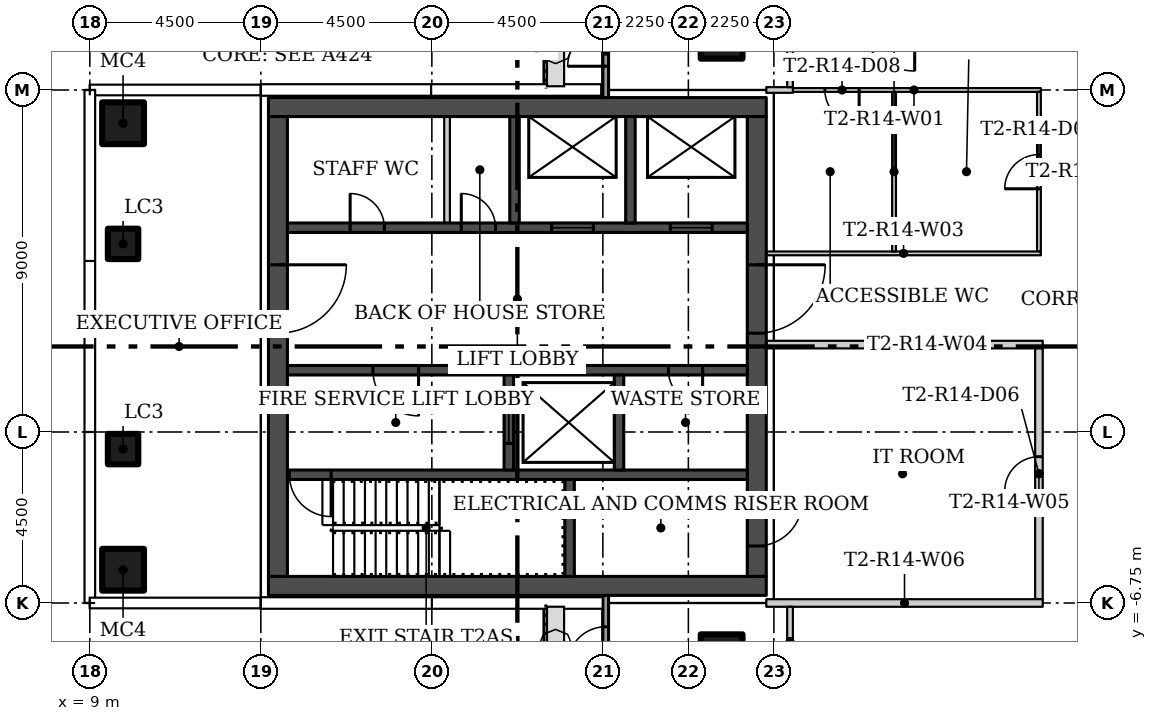
"""IFC4 building model, lengths in metres.
Left out: names, types, materials, properties, quantities, classifications, styles, units other than length and angle.
Written with IfcOpenShell. Run it as: python <this file> out.ifc"""

import sys

from ifc_helpers import new_model, si_unit, direction, frame, frame_2d, origin, origin_2d, place, context, subcontext, project, spatial, rectangle, hollow_rectangle, extrude, element, fill, save


model = new_model("IFC4")
c1 = context("Model", 3, precision=1e-05, world=origin(), true_north=direction((0.0, 1.0)))
c2 = subcontext(c1, "Body", "Model", "MODEL_VIEW")
j1 = project(units=[si_unit("LENGTHUNIT", "METRE"), si_unit("PLANEANGLEUNIT", "RADIAN")], contexts=[c1])
p1 = place(None, origin())
s1 = spatial("IfcSite", under=j1, at=p1, CompositionType="ELEMENT")
p2 = place(p1, origin())
s2 = spatial("IfcBuilding", under=s1, at=p2, CompositionType="ELEMENT")
p3 = place(p2, frame((0.0, 0.0, 138.9)))
s3 = spatial("IfcBuildingStorey", under=s2, at=p3, CompositionType="ELEMENT", Elevation=138.9)
for number, where in (
    (1, (25.625, 8.125, 0.0)),
    (2, (25.625, -8.125, 0.0)),
    (3, (9.875, -5.875, 0.0)),
    (4, (9.875, 5.875, 0.0)),
):
    element("IfcColumn", number, at=place(p3, frame(where)), inside=s3, PredefinedType="COLUMN", context=c2, shape_type="SweptSolid", body=[
        extrude(hollow_rectangle(XDim=1.1, YDim=1.1, WallThickness=0.04, at=origin_2d()), origin(), (0.0, 0.0, 1.0), 3.55),
    ])
for number, where in (
    (5, (9.875, -2.7, 0.0)),
    (6, (9.875, 2.7, 0.0)),
):
    element("IfcColumn", number, at=place(p3, frame(where)), inside=s3, PredefinedType="COLUMN", context=c2, shape_type="SweptSolid", body=[
        extrude(hollow_rectangle(XDim=0.8, YDim=0.8, WallThickness=0.03, at=origin_2d()), origin(), (0.0, 0.0, 1.0), 3.55),
    ])
p4 = place(p3, frame((34.025, 6.75, 0.0), z_axis=(0.0, 0.0, 1.0), x_axis=(-1.0, 0.0, 0.0)))
e7 = element("IfcWall", 7, at=p4, inside=s3, PredefinedType="PARTITIONING", context=c2, shape_type="SweptSolid", body=[
    extrude(rectangle(XDim=6.675, YDim=0.1, at=frame_2d((3.337, 0.0))), origin(), (0.0, 0.0, 1.0), 3.55),
])
p5 = place(p4, frame((4.781, 0.0, 0.0)))
e8 = element("IfcOpeningElement", 8, at=p5, cuts=e7, PredefinedType="OPENING", context=c2, shape_type="SweptSolid", body=[
    extrude(rectangle(XDim=0.9, YDim=2.1, at=frame_2d((0.45, 1.05))), frame((0.0, 0.06, 0.0), z_axis=(0.0, -1.0, 0.0), x_axis=(1.0, 0.0, 0.0)), (0.0, 0.0, 1.0), 0.12),
])
p6 = place(p3, frame((33.975, 2.5, 0.0), z_axis=(0.0, 0.0, 1.0), x_axis=(0.0, 1.0, 0.0)))
e9 = element("IfcWall", 9, at=p6, inside=s3, PredefinedType="PARTITIONING", context=c2, shape_type="SweptSolid", body=[
    extrude(rectangle(XDim=4.2, YDim=0.1, at=frame_2d((2.1, 0.0))), origin(), (0.0, 0.0, 1.0), 3.55),
])
p7 = place(p6, frame((1.65, 0.0, 0.0)))
e10 = element("IfcOpeningElement", 10, at=p7, cuts=e9, PredefinedType="OPENING", context=c2, shape_type="SweptSolid", body=[
    extrude(rectangle(XDim=0.9, YDim=2.1, at=frame_2d((0.45, 1.05))), frame((0.0, 0.06, 0.0), z_axis=(0.0, -1.0, 0.0), x_axis=(1.0, 0.0, 0.0)), (0.0, 0.0, 1.0), 0.12),
])
p8 = place(p3, frame((26.8, 2.45, 0.0)))
e11 = element("IfcWall", 11, at=p8, inside=s3, PredefinedType="PARTITIONING", context=c2, shape_type="SweptSolid", body=[
    extrude(rectangle(XDim=7.225, YDim=0.1, at=frame_2d((3.612, 0.0))), origin(), (0.0, 0.0, 1.0), 3.55),
])
p9 = place(p3, frame((34.075, 0.05, 0.0), z_axis=(0.0, 0.0, 1.0), x_axis=(-1.0, 0.0, 0.0)))
e12 = element("IfcWall", 12, at=p9, inside=s3, PredefinedType="PARTITIONING", context=c2, shape_type="SweptSolid", body=[
    extrude(rectangle(XDim=7.275, YDim=0.2, at=frame_2d((3.637, 0.0))), origin(), (0.0, 0.0, 1.0), 3.55),
])
p10 = place(p3, frame((33.975, -6.65, 0.0), z_axis=(0.0, 0.0, 1.0), x_axis=(0.0, 1.0, 0.0)))
e13 = element("IfcWall", 13, at=p10, inside=s3, PredefinedType="PARTITIONING", context=c2, shape_type="SweptSolid", body=[
    extrude(rectangle(XDim=6.6, YDim=0.2, at=frame_2d((3.3, 0.0))), origin(), (0.0, 0.0, 1.0), 3.55),
])
p11 = place(p10, frame((2.85, 0.0, 0.0)))
e14 = element("IfcOpeningElement", 14, at=p11, cuts=e13, PredefinedType="OPENING", context=c2, shape_type="SweptSolid", body=[
    extrude(rectangle(XDim=0.9, YDim=2.1, at=frame_2d((0.45, 1.05))), frame((0.0, 0.11, 0.0), z_axis=(0.0, -1.0, 0.0), x_axis=(1.0, 0.0, 0.0)), (0.0, 0.0, 1.0), 0.22),
])
p12 = place(p3, frame((26.8, -6.75, 0.0)))
e15 = element("IfcWall", 15, at=p12, inside=s3, PredefinedType="PARTITIONING", context=c2, shape_type="SweptSolid", body=[
    extrude(rectangle(XDim=7.275, YDim=0.2, at=frame_2d((3.637, 0.0))), origin(), (0.0, 0.0, 1.0), 3.55),
])
p13 = place(p3, frame((27.5, 6.75, 0.0), z_axis=(0.0, 0.0, 1.0), x_axis=(-1.0, 0.0, 0.0)))
e16 = element("IfcWall", 16, at=p13, inside=s3, PredefinedType="PARTITIONING", context=c2, shape_type="SweptSolid", body=[
    extrude(rectangle(XDim=0.7, YDim=0.15, at=frame_2d((0.35, 0.0))), origin(), (0.0, 0.0, 1.0), 3.55),
])
p14 = place(p3, frame((27.425, -6.85, 0.0), z_axis=(0.0, 0.0, 1.0), x_axis=(0.0, -1.0, 0.0)))
e17 = element("IfcWall", 17, at=p14, inside=s3, PredefinedType="PARTITIONING", context=c2, shape_type="SweptSolid", body=[
    extrude(rectangle(XDim=1.825, YDim=0.15, at=frame_2d((0.913, 0.0))), origin(), (0.0, 0.0, 1.0), 3.55),
])
p15 = place(p3, frame((27.425, 8.675, 0.0), z_axis=(0.0, 0.0, 1.0), x_axis=(0.0, -1.0, 0.0)))
e18 = element("IfcWall", 18, at=p15, inside=s3, PredefinedType="PARTITIONING", context=c2, shape_type="SweptSolid", body=[
    extrude(rectangle(XDim=1.85, YDim=0.15, at=frame_2d((0.925, 0.0))), origin(), (0.0, 0.0, 1.0), 3.55),
])
p16 = place(p3, frame((30.162, 6.7, 0.0), z_axis=(0.0, 0.0, 1.0), x_axis=(0.0, -1.0, 0.0)))
e19 = element("IfcWall", 19, at=p16, inside=s3, PredefinedType="PARTITIONING", context=c2, shape_type="SweptSolid", body=[
    extrude(rectangle(XDim=4.2, YDim=0.1, at=frame_2d((2.1, 0.0))), origin(), (0.0, 0.0, 1.0), 3.55),
])
p17 = place(p3, frame((22.575, 6.543, 0.0), z_axis=(0.0, 0.0, 1.0), x_axis=(0.0, 1.0, 0.0)))
e20 = element("IfcWall", 20, at=p17, inside=s3, PredefinedType="SOLIDWALL", context=c2, shape_type="SweptSolid", body=[
    extrude(rectangle(XDim=2.457, YDim=0.15, at=frame_2d((1.229, 0.0))), origin(), (0.0, 0.0, 1.0), 3.45),
])
p18 = place(p17, frame((0.832, 0.0, 0.0)))
e21 = element("IfcOpeningElement", 21, at=p18, cuts=e20, PredefinedType="OPENING", context=c2, shape_type="SweptSolid", body=[
    extrude(rectangle(XDim=1.0, YDim=2.4, at=frame_2d((0.5, 1.2))), frame((0.0, 0.085, 0.0), z_axis=(0.0, -1.0, 0.0), x_axis=(1.0, 0.0, 0.0)), (0.0, 0.0, 1.0), 0.17),
])
p19 = place(p3, frame((22.575, -9.0, 0.0), z_axis=(0.0, 0.0, 1.0), x_axis=(0.0, 1.0, 0.0)))
e22 = element("IfcWall", 22, at=p19, inside=s3, PredefinedType="SOLIDWALL", context=c2, shape_type="SweptSolid", body=[
    extrude(rectangle(XDim=2.457, YDim=0.15, at=frame_2d((1.229, 0.0))), origin(), (0.0, 0.0, 1.0), 3.45),
])
p20 = place(p19, frame((0.625, 0.0, 0.0)))
e23 = element("IfcOpeningElement", 23, at=p20, cuts=e22, PredefinedType="OPENING", context=c2, shape_type="SweptSolid", body=[
    extrude(rectangle(XDim=1.0, YDim=2.4, at=frame_2d((0.5, 1.2))), frame((0.0, 0.085, 0.0), z_axis=(0.0, -1.0, 0.0), x_axis=(1.0, 0.0, 0.0)), (0.0, 0.0, 1.0), 0.17),
])
for number, where in (
    (24, (13.7, -6.3, 0.0)),
    (25, (13.7, 6.3, 0.0)),
):
    element("IfcWall", number, at=place(p3, frame(where)), inside=s3, PredefinedType="SHEAR", context=c2, shape_type="SweptSolid", body=[
        extrude(rectangle(XDim=13.1, YDim=0.5, at=frame_2d((6.55, 0.0))), origin(), (0.0, 0.0, 1.0), 3.55),
    ])
p21 = place(p3, frame((13.95, 6.05, 0.0), z_axis=(0.0, 0.0, 1.0), x_axis=(0.0, -1.0, 0.0)))
e26 = element("IfcWall", 26, at=p21, inside=s3, PredefinedType="SHEAR", context=c2, shape_type="SweptSolid", body=[
    extrude(rectangle(XDim=12.1, YDim=0.5, at=frame_2d((6.05, 0.0))), origin(), (0.0, 0.0, 1.0), 3.55),
])
p22 = place(p21, frame((3.9, 0.0, 0.0)))
e27 = element("IfcOpeningElement", 27, at=p22, cuts=e26, PredefinedType="OPENING", context=c2, shape_type="SweptSolid", body=[
    extrude(rectangle(XDim=1.8, YDim=2.4, at=frame_2d((0.9, 1.2))), frame((0.0, 0.26, 0.0), z_axis=(0.0, -1.0, 0.0), x_axis=(1.0, 0.0, 0.0)), (0.0, 0.0, 1.0), 0.52),
])
p23 = place(p3, frame((26.55, 6.05, 0.0), z_axis=(0.0, 0.0, 1.0), x_axis=(0.0, -1.0, 0.0)))
e28 = element("IfcWall", 28, at=p23, inside=s3, PredefinedType="SHEAR", context=c2, shape_type="SweptSolid", body=[
    extrude(rectangle(XDim=12.1, YDim=0.5, at=frame_2d((6.05, 0.0))), origin(), (0.0, 0.0, 1.0), 3.55),
])
p24 = place(p23, frame((10.1, 0.0, 0.0)))
e29 = element("IfcOpeningElement", 29, at=p24, cuts=e28, PredefinedType="OPENING", context=c2, shape_type="SweptSolid", body=[
    extrude(rectangle(XDim=1.2, YDim=2.1, at=frame_2d((0.6, 1.05))), frame((0.0, 0.26, 0.0), z_axis=(0.0, -1.0, 0.0), x_axis=(1.0, 0.0, 0.0)), (0.0, 0.0, 1.0), 0.52),
])
p25 = place(p23, frame((3.9, 0.0, 0.0)))
e30 = element("IfcOpeningElement", 30, at=p25, cuts=e28, PredefinedType="OPENING", context=c2, shape_type="SweptSolid", body=[
    extrude(rectangle(XDim=1.8, YDim=2.4, at=frame_2d((0.9, 1.2))), frame((0.0, 0.26, 0.0), z_axis=(0.0, -1.0, 0.0), x_axis=(1.0, 0.0, 0.0)), (0.0, 0.0, 1.0), 0.52),
])
p26 = place(p3, frame((26.3, -3.375, 0.0), z_axis=(0.0, 0.0, 1.0), x_axis=(-1.0, 0.0, 0.0)))
e31 = element("IfcWall", 31, at=p26, inside=s3, PredefinedType="SHEAR", context=c2, shape_type="SweptSolid", body=[
    extrude(rectangle(XDim=12.1, YDim=0.25, at=frame_2d((6.05, 0.0))), origin(), (0.0, 0.0, 1.0), 3.55),
])
p27 = place(p26, frame((10.95, 0.0, 0.0)))
e32 = element("IfcOpeningElement", 32, at=p27, cuts=e31, PredefinedType="OPENING", context=c2, shape_type="SweptSolid", body=[
    extrude(rectangle(XDim=1.1, YDim=2.1, at=frame_2d((0.55, 1.05))), frame((0.0, 0.135, 0.0), z_axis=(0.0, -1.0, 0.0), x_axis=(1.0, 0.0, 0.0)), (0.0, 0.0, 1.0), 0.27),
])
p28 = place(p3, frame((21.625, -6.05, 0.0), z_axis=(0.0, 0.0, 1.0), x_axis=(0.0, 1.0, 0.0)))
e33 = element("IfcWall", 33, at=p28, inside=s3, PredefinedType="SHEAR", context=c2, shape_type="SweptSolid", body=[
    extrude(rectangle(XDim=2.55, YDim=0.25, at=frame_2d((1.275, 0.0))), origin(), (0.0, 0.0, 1.0), 3.55),
])
p29 = place(p3, frame((26.3, -0.625, 0.0), z_axis=(0.0, 0.0, 1.0), x_axis=(-1.0, 0.0, 0.0)))
e34 = element("IfcWall", 34, at=p29, inside=s3, PredefinedType="SHEAR", context=c2, shape_type="SweptSolid", body=[
    extrude(rectangle(XDim=12.1, YDim=0.25, at=frame_2d((6.05, 0.0))), origin(), (0.0, 0.0, 1.0), 3.55),
])
p30 = place(p29, frame((8.65, 0.0, 0.0)))
e35 = element("IfcOpeningElement", 35, at=p30, cuts=e34, PredefinedType="OPENING", context=c2, shape_type="SweptSolid", body=[
    extrude(rectangle(XDim=1.2, YDim=2.1, at=frame_2d((0.6, 1.05))), frame((0.0, 0.135, 0.0), z_axis=(0.0, -1.0, 0.0), x_axis=(1.0, 0.0, 0.0)), (0.0, 0.0, 1.0), 0.27),
])
p31 = place(p29, frame((1.175, 0.0, 0.0)))
e36 = element("IfcOpeningElement", 36, at=p31, cuts=e34, PredefinedType="OPENING", context=c2, shape_type="SweptSolid", body=[
    extrude(rectangle(XDim=0.9, YDim=2.1, at=frame_2d((0.45, 1.05))), frame((0.0, 0.135, 0.0), z_axis=(0.0, -1.0, 0.0), x_axis=(1.0, 0.0, 0.0)), (0.0, 0.0, 1.0), 0.27),
])
p32 = place(p3, frame((20.025, -3.25, 0.0), z_axis=(0.0, 0.0, 1.0), x_axis=(0.0, 1.0, 0.0)))
e37 = element("IfcWall", 37, at=p32, inside=s3, PredefinedType="SHEAR", context=c2, shape_type="SweptSolid", body=[
    extrude(rectangle(XDim=2.5, YDim=0.25, at=frame_2d((1.25, 0.0))), origin(), (0.0, 0.0, 1.0), 3.55),
])
p33 = place(p32, frame((0.7, 0.0, 0.0)))
e38 = element("IfcOpeningElement", 38, at=p33, cuts=e37, PredefinedType="OPENING", context=c2, shape_type="SweptSolid", body=[
    extrude(rectangle(XDim=1.1, YDim=2.1, at=frame_2d((0.55, 1.05))), frame((0.0, 0.135, 0.0), z_axis=(0.0, -1.0, 0.0), x_axis=(1.0, 0.0, 0.0)), (0.0, 0.0, 1.0), 0.27),
])
p34 = place(p3, frame((22.925, -3.25, 0.0), z_axis=(0.0, 0.0, 1.0), x_axis=(0.0, 1.0, 0.0)))
e39 = element("IfcWall", 39, at=p34, inside=s3, PredefinedType="SHEAR", context=c2, shape_type="SweptSolid", body=[
    extrude(rectangle(XDim=2.5, YDim=0.25, at=frame_2d((1.25, 0.0))), origin(), (0.0, 0.0, 1.0), 3.55),
])
p35 = place(p3, frame((14.2, 3.125, 0.0)))
e40 = element("IfcWall", 40, at=p35, inside=s3, PredefinedType="SHEAR", context=c2, shape_type="SweptSolid", body=[
    extrude(rectangle(XDim=12.1, YDim=0.25, at=frame_2d((6.05, 0.0))), origin(), (0.0, 0.0, 1.0), 3.55),
])
p36 = place(p35, frame((6.95, 0.0, 0.0)))
e41 = element("IfcOpeningElement", 41, at=p36, cuts=e40, PredefinedType="OPENING", context=c2, shape_type="SweptSolid", body=[
    extrude(rectangle(XDim=1.1, YDim=2.1, at=frame_2d((0.55, 1.05))), frame((0.0, 0.135, 0.0), z_axis=(0.0, -1.0, 0.0), x_axis=(1.0, 0.0, 0.0)), (0.0, 0.0, 1.0), 0.27),
])
p37 = place(p35, frame((10.075, 0.0, 0.0)))
e42 = element("IfcOpeningElement", 42, at=p37, cuts=e40, PredefinedType="OPENING", context=c2, shape_type="SweptSolid", body=[
    extrude(rectangle(XDim=1.1, YDim=2.1, at=frame_2d((0.55, 1.05))), frame((0.0, 0.135, 0.0), z_axis=(0.0, -1.0, 0.0), x_axis=(1.0, 0.0, 0.0)), (0.0, 0.0, 1.0), 0.27),
])
p38 = place(p35, frame((1.65, 0.0, 0.0)))
e43 = element("IfcOpeningElement", 43, at=p38, cuts=e40, PredefinedType="OPENING", context=c2, shape_type="SweptSolid", body=[
    extrude(rectangle(XDim=0.9, YDim=2.1, at=frame_2d((0.45, 1.05))), frame((0.0, 0.135, 0.0), z_axis=(0.0, -1.0, 0.0), x_axis=(1.0, 0.0, 0.0)), (0.0, 0.0, 1.0), 0.27),
])
p39 = place(p35, frame((4.575, 0.0, 0.0)))
e44 = element("IfcOpeningElement", 44, at=p39, cuts=e40, PredefinedType="OPENING", context=c2, shape_type="SweptSolid", body=[
    extrude(rectangle(XDim=0.9, YDim=2.1, at=frame_2d((0.45, 1.05))), frame((0.0, 0.135, 0.0), z_axis=(0.0, -1.0, 0.0), x_axis=(1.0, 0.0, 0.0)), (0.0, 0.0, 1.0), 0.27),
])
for number, where, z_axis, x_axis in (
    (45, (20.175, 3.25, 0.0), (0.0, 0.0, 1.0), (0.0, 1.0, 0.0)),
    (46, (23.225, 3.25, 0.0), (0.0, 0.0, 1.0), (0.0, 1.0, 0.0)),
):
    element("IfcWall", number, at=place(p3, frame(where, z_axis=z_axis, x_axis=x_axis)), inside=s3, PredefinedType="SHEAR", context=c2, shape_type="SweptSolid", body=[
        extrude(rectangle(XDim=2.8, YDim=0.25, at=frame_2d((1.4, 0.0))), origin(), (0.0, 0.0, 1.0), 3.55),
    ])
p40 = place(p3, frame((18.4, 3.25, 0.0), z_axis=(0.0, 0.0, 1.0), x_axis=(0.0, 1.0, 0.0)))
e47 = element("IfcWall", 47, at=p40, inside=s3, PredefinedType="PARTITIONING", context=c2, shape_type="SweptSolid", body=[
    extrude(rectangle(XDim=2.8, YDim=0.15, at=frame_2d((1.4, 0.0))), origin(), (0.0, 0.0, 1.0), 3.55),
])
p41 = place(p11, origin())
e48 = element("IfcDoor", 48, at=p41, inside=s3, OperationType="SINGLE_SWING_LEFT", PredefinedType="DOOR", context=c2, shape_type="SweptSolid", body=[
    extrude(rectangle(XDim=0.9, YDim=2.1, at=frame_2d((0.45, 1.05))), frame((0.0, 0.025, 0.0), z_axis=(0.0, -1.0, 0.0), x_axis=(1.0, 0.0, 0.0)), (0.0, 0.0, 1.0), 0.05),
])
fill(e14, e48)
p42 = place(p7, origin())
e49 = element("IfcDoor", 49, at=p42, inside=s3, OperationType="SINGLE_SWING_LEFT", PredefinedType="DOOR", context=c2, shape_type="SweptSolid", body=[
    extrude(rectangle(XDim=0.9, YDim=2.1, at=frame_2d((0.45, 1.05))), frame((0.0, 0.025, 0.0), z_axis=(0.0, -1.0, 0.0), x_axis=(1.0, 0.0, 0.0)), (0.0, 0.0, 1.0), 0.05),
])
fill(e10, e49)
p43 = place(p5, origin())
e50 = element("IfcDoor", 50, at=p43, inside=s3, OperationType="SINGLE_SWING_RIGHT", PredefinedType="DOOR", context=c2, shape_type="SweptSolid", body=[
    extrude(rectangle(XDim=0.9, YDim=2.1, at=frame_2d((0.45, 1.05))), frame((0.0, 0.025, 0.0), z_axis=(0.0, -1.0, 0.0), x_axis=(1.0, 0.0, 0.0)), (0.0, 0.0, 1.0), 0.05),
])
fill(e8, e50)
p44 = place(p18, origin())
e51 = element("IfcDoor", 51, at=p44, inside=s3, OperationType="SINGLE_SWING_LEFT", PredefinedType="DOOR", context=c2, shape_type="SweptSolid", body=[
    extrude(rectangle(XDim=1.0, YDim=2.4, at=frame_2d((0.5, 1.2))), frame((0.0, 0.025, 0.0), z_axis=(0.0, -1.0, 0.0), x_axis=(1.0, 0.0, 0.0)), (0.0, 0.0, 1.0), 0.05),
])
fill(e21, e51)
p45 = place(p20, origin())
e52 = element("IfcDoor", 52, at=p45, inside=s3, OperationType="SINGLE_SWING_LEFT", PredefinedType="DOOR", context=c2, shape_type="SweptSolid", body=[
    extrude(rectangle(XDim=1.0, YDim=2.4, at=frame_2d((0.5, 1.2))), frame((0.0, 0.025, 0.0), z_axis=(0.0, -1.0, 0.0), x_axis=(1.0, 0.0, 0.0)), (0.0, 0.0, 1.0), 0.05),
])
fill(e23, e52)
p46 = place(p22, origin())
e53 = element("IfcDoor", 53, at=p46, inside=s3, OperationType="DOUBLE_DOOR_SINGLE_SWING", PredefinedType="DOOR", context=c2, shape_type="SweptSolid", body=[
    extrude(rectangle(XDim=1.8, YDim=2.4, at=frame_2d((0.9, 1.2))), frame((0.0, 0.025, 0.0), z_axis=(0.0, -1.0, 0.0), x_axis=(1.0, 0.0, 0.0)), (0.0, 0.0, 1.0), 0.05),
])
fill(e27, e53)
p47 = place(p24, origin())
e54 = element("IfcDoor", 54, at=p47, inside=s3, OperationType="SINGLE_SWING_RIGHT", PredefinedType="DOOR", context=c2, shape_type="SweptSolid", body=[
    extrude(rectangle(XDim=1.2, YDim=2.1, at=frame_2d((0.6, 1.05))), frame((0.0, 0.025, 0.0), z_axis=(0.0, -1.0, 0.0), x_axis=(1.0, 0.0, 0.0)), (0.0, 0.0, 1.0), 0.05),
])
fill(e29, e54)
p48 = place(p25, origin())
e55 = element("IfcDoor", 55, at=p48, inside=s3, OperationType="DOUBLE_DOOR_SINGLE_SWING", PredefinedType="DOOR", context=c2, shape_type="SweptSolid", body=[
    extrude(rectangle(XDim=1.8, YDim=2.4, at=frame_2d((0.9, 1.2))), frame((0.0, 0.025, 0.0), z_axis=(0.0, -1.0, 0.0), x_axis=(1.0, 0.0, 0.0)), (0.0, 0.0, 1.0), 0.05),
])
fill(e30, e55)
p49 = place(p27, origin())
e56 = element("IfcDoor", 56, at=p49, inside=s3, OperationType="SINGLE_SWING_RIGHT", PredefinedType="DOOR", context=c2, shape_type="SweptSolid", body=[
    extrude(rectangle(XDim=1.1, YDim=2.1, at=frame_2d((0.55, 1.05))), frame((0.0, 0.025, 0.0), z_axis=(0.0, -1.0, 0.0), x_axis=(1.0, 0.0, 0.0)), (0.0, 0.0, 1.0), 0.05),
])
fill(e32, e56)
p50 = place(p30, origin())
e57 = element("IfcDoor", 57, at=p50, inside=s3, OperationType="SINGLE_SWING_RIGHT", PredefinedType="DOOR", context=c2, shape_type="SweptSolid", body=[
    extrude(rectangle(XDim=1.2, YDim=2.1, at=frame_2d((0.6, 1.05))), frame((0.0, 0.025, 0.0), z_axis=(0.0, -1.0, 0.0), x_axis=(1.0, 0.0, 0.0)), (0.0, 0.0, 1.0), 0.05),
])
fill(e35, e57)
p51 = place(p31, origin())
e58 = element("IfcDoor", 58, at=p51, inside=s3, OperationType="SINGLE_SWING_LEFT", PredefinedType="DOOR", context=c2, shape_type="SweptSolid", body=[
    extrude(rectangle(XDim=0.9, YDim=2.1, at=frame_2d((0.45, 1.05))), frame((0.0, 0.025, 0.0), z_axis=(0.0, -1.0, 0.0), x_axis=(1.0, 0.0, 0.0)), (0.0, 0.0, 1.0), 0.05),
])
fill(e36, e58)
p52 = place(p33, origin())
e59 = element("IfcDoor", 59, at=p52, inside=s3, OperationType="SLIDING_TO_LEFT", PredefinedType="DOOR", context=c2, shape_type="SweptSolid", body=[
    extrude(rectangle(XDim=1.1, YDim=2.1, at=frame_2d((0.55, 1.05))), frame((0.0, 0.025, 0.0), z_axis=(0.0, -1.0, 0.0), x_axis=(1.0, 0.0, 0.0)), (0.0, 0.0, 1.0), 0.05),
])
fill(e38, e59)
p53 = place(p36, origin())
e60 = element("IfcDoor", 60, at=p53, inside=s3, OperationType="SLIDING_TO_LEFT", PredefinedType="DOOR", context=c2, shape_type="SweptSolid", body=[
    extrude(rectangle(XDim=1.1, YDim=2.1, at=frame_2d((0.55, 1.05))), frame((0.0, 0.025, 0.0), z_axis=(0.0, -1.0, 0.0), x_axis=(1.0, 0.0, 0.0)), (0.0, 0.0, 1.0), 0.05),
])
fill(e41, e60)
p54 = place(p37, origin())
e61 = element("IfcDoor", 61, at=p54, inside=s3, OperationType="SLIDING_TO_LEFT", PredefinedType="DOOR", context=c2, shape_type="SweptSolid", body=[
    extrude(rectangle(XDim=1.1, YDim=2.1, at=frame_2d((0.55, 1.05))), frame((0.0, 0.025, 0.0), z_axis=(0.0, -1.0, 0.0), x_axis=(1.0, 0.0, 0.0)), (0.0, 0.0, 1.0), 0.05),
])
fill(e42, e61)
p55 = place(p38, origin())
e62 = element("IfcDoor", 62, at=p55, inside=s3, OperationType="SINGLE_SWING_LEFT", PredefinedType="DOOR", context=c2, shape_type="SweptSolid", body=[
    extrude(rectangle(XDim=0.9, YDim=2.1, at=frame_2d((0.45, 1.05))), frame((0.0, 0.025, 0.0), z_axis=(0.0, -1.0, 0.0), x_axis=(1.0, 0.0, 0.0)), (0.0, 0.0, 1.0), 0.05),
])
fill(e43, e62)
p56 = place(p39, origin())
e63 = element("IfcDoor", 63, at=p56, inside=s3, OperationType="SINGLE_SWING_LEFT", PredefinedType="DOOR", context=c2, shape_type="SweptSolid", body=[
    extrude(rectangle(XDim=0.9, YDim=2.1, at=frame_2d((0.45, 1.05))), frame((0.0, 0.025, 0.0), z_axis=(0.0, -1.0, 0.0), x_axis=(1.0, 0.0, 0.0)), (0.0, 0.0, 1.0), 0.05),
])
fill(e44, e63)
save(model, sys.argv[1])
